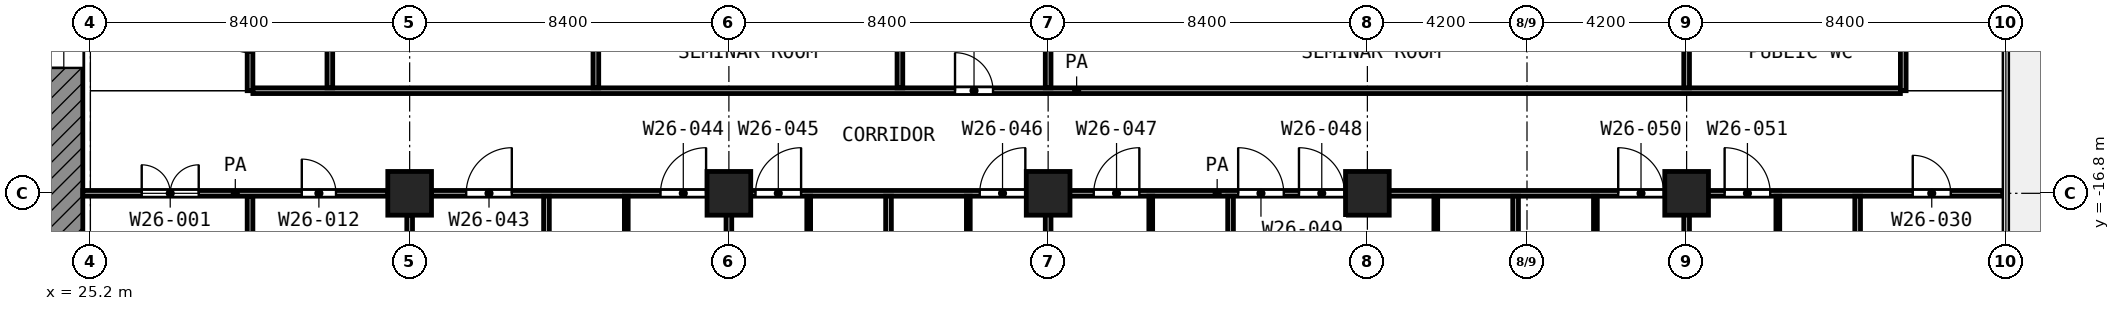
"""IFC4 building model, lengths in metres.
Left out: names, types, materials, properties, quantities, classifications, styles, units other than length and angle.
Written with IfcOpenShell. Run it as: python <this file> out.ifc"""

import sys

from ifc_helpers import new_model, si_unit, direction, frame, frame_2d, origin, origin_2d, place, context, subcontext, project, spatial, rectangle, extrude, element, fill, save


model = new_model("IFC4")
c1 = context("Model", 3, precision=1e-05, world=origin(), true_north=direction((0.0, 1.0)))
c2 = subcontext(c1, "Body", "Model", "MODEL_VIEW")
j1 = project(units=[si_unit("LENGTHUNIT", "METRE"), si_unit("PLANEANGLEUNIT", "RADIAN")], contexts=[c1])
p1 = place(None, origin())
s1 = spatial("IfcSite", under=j1, at=p1, CompositionType="ELEMENT")
p2 = place(p1, origin())
s2 = spatial("IfcBuilding", under=s1, at=p2, CompositionType="ELEMENT")
p3 = place(p2, frame((0.0, 0.0, 136.6)))
s3 = spatial("IfcBuildingStorey", under=s2, at=p3, CompositionType="ELEMENT", Elevation=136.6)
for number, where, z_axis, x_axis in (
    (1, (33.6, -16.8, 0.0), (0.0, 0.0, 1.0), (1.0, 0.0, 0.0)),
    (2, (42.0, -16.8, 0.0), (0.0, 0.0, 1.0), (1.0, 0.0, 0.0)),
    (3, (50.4, -16.8, 0.0), (0.0, 0.0, 1.0), (1.0, 0.0, 0.0)),
    (4, (58.8, -16.8, 0.0), (0.0, 0.0, 1.0), (1.0, 0.0, 0.0)),
    (5, (67.2, -16.8, 0.0), (0.0, 0.0, 1.0), (1.0, 0.0, 0.0)),
):
    element("IfcColumn", number, at=place(p3, frame(where, z_axis=z_axis, x_axis=x_axis)), inside=s3, PredefinedType="COLUMN", context=c2, shape_type="SweptSolid", body=[
        extrude(rectangle(XDim=1.15, YDim=1.15, at=origin_2d()), origin(), (0.0, 0.0, 1.0), 4.2),
    ])
p4 = place(p3, frame((24.5, -24.0, 0.0), z_axis=(0.0, 0.0, 1.0), x_axis=(0.0, 1.0, 0.0)))
e6 = element("IfcWall", 6, at=p4, inside=s3, PredefinedType="SHEAR", context=c2, shape_type="SweptSolid", body=[
    extrude(rectangle(XDim=18.6, YDim=1.0, at=frame_2d((9.3, 0.0))), origin(), (0.0, 0.0, 1.0), 3.6),
])
p5 = place(p4, frame((10.5, 0.0, 0.0)))
e7 = element("IfcOpeningElement", 7, at=p5, cuts=e6, PredefinedType="OPENING", context=c2, shape_type="SweptSolid", body=[
    extrude(rectangle(XDim=1.8, YDim=2.1, at=frame_2d((0.9, 1.05))), frame((0.0, 0.51, 0.0), z_axis=(0.0, -1.0, 0.0), x_axis=(1.0, 0.0, 0.0)), (0.0, 0.0, 1.0), 1.02),
])
for number, where, z_axis, x_axis in (
    (8, (39.3, -20.1, 0.0), (0.0, 0.0, 1.0), (0.0, 1.0, 0.0)),
    (9, (44.1, -20.1, 0.0), (0.0, 0.0, 1.0), (0.0, 1.0, 0.0)),
    (10, (48.3, -20.1, 0.0), (0.0, 0.0, 1.0), (0.0, 1.0, 0.0)),
):
    element("IfcWall", number, at=place(p3, frame(where, z_axis=z_axis, x_axis=x_axis)), inside=s3, PredefinedType="PARTITIONING", context=c2, shape_type="SweptSolid", body=[
        extrude(rectangle(XDim=3.225, YDim=0.1, at=frame_2d((1.613, 0.0))), origin(), (0.0, 0.0, 1.0), 3.6),
    ])
p6 = place(p3, frame((53.1, -19.5, 0.0), z_axis=(0.0, 0.0, 1.0), x_axis=(0.0, 1.0, 0.0)))
e11 = element("IfcWall", 11, at=p6, inside=s3, PredefinedType="PARTITIONING", context=c2, shape_type="SweptSolid", body=[
    extrude(rectangle(XDim=2.625, YDim=0.1, at=frame_2d((1.312, 0.0))), origin(), (0.0, 0.0, 1.0), 3.6),
])
p7 = place(p3, frame((60.6, -20.099, 0.0), z_axis=(0.0, 0.0, 1.0), x_axis=(0.0, 1.0, 0.0)))
e12 = element("IfcWall", 12, at=p7, inside=s3, PredefinedType="PARTITIONING", context=c2, shape_type="SweptSolid", body=[
    extrude(rectangle(XDim=3.224, YDim=0.1, at=frame_2d((1.612, 0.0))), origin(), (0.0, 0.0, 1.0), 3.6),
])
for number, where, z_axis, x_axis in (
    (13, (64.8, -20.1, 0.0), (0.0, 0.0, 1.0), (0.0, 1.0, 0.0)),
    (14, (69.6, -20.1, 0.0), (0.0, 0.0, 1.0), (0.0, 1.0, 0.0)),
):
    element("IfcWall", number, at=place(p3, frame(where, z_axis=z_axis, x_axis=x_axis)), inside=s3, PredefinedType="PARTITIONING", context=c2, shape_type="SweptSolid", body=[
        extrude(rectangle(XDim=3.225, YDim=0.1, at=frame_2d((1.613, 0.0))), origin(), (0.0, 0.0, 1.0), 3.6),
    ])
p8 = place(p3, frame((25.0, -16.8, 0.0), z_axis=(0.0, 0.0, 1.0), x_axis=(1.0, 0.0, 0.0)))
e15 = element("IfcWall", 15, at=p8, inside=s3, PredefinedType="PARTITIONING", context=c2, shape_type="SweptSolid", body=[
    extrude(rectangle(XDim=8.025, YDim=0.15, at=frame_2d((4.012, 0.0))), origin(), (0.0, 0.0, 1.0), 3.6),
])
p9 = place(p8, frame((1.55, 0.0, 0.0)))
e16 = element("IfcOpeningElement", 16, at=p9, cuts=e15, PredefinedType="OPENING", context=c2, shape_type="SweptSolid", body=[
    extrude(rectangle(XDim=1.5, YDim=2.1, at=frame_2d((0.75, 1.05))), frame((0.0, 0.085, 0.0), z_axis=(0.0, -1.0, 0.0), x_axis=(1.0, 0.0, 0.0)), (0.0, 0.0, 1.0), 0.17),
])
p10 = place(p8, frame((5.762, 0.0, 0.0)))
e17 = element("IfcOpeningElement", 17, at=p10, cuts=e15, PredefinedType="OPENING", context=c2, shape_type="SweptSolid", body=[
    extrude(rectangle(XDim=0.9, YDim=2.1, at=frame_2d((0.45, 1.05))), frame((0.0, 0.085, 0.0), z_axis=(0.0, -1.0, 0.0), x_axis=(1.0, 0.0, 0.0)), (0.0, 0.0, 1.0), 0.17),
])
p11 = place(p3, frame((34.175, -16.8, 0.0), z_axis=(0.0, 0.0, 1.0), x_axis=(1.0, 0.0, 0.0)))
e18 = element("IfcWall", 18, at=p11, inside=s3, PredefinedType="PARTITIONING", context=c2, shape_type="SweptSolid", body=[
    extrude(rectangle(XDim=41.345, YDim=0.15, at=frame_2d((20.672, 0.0))), origin(), (0.0, 0.0, 1.0), 3.6),
])
p12 = place(p11, frame((0.913, 0.0, 0.0)))
e19 = element("IfcOpeningElement", 19, at=p12, cuts=e18, PredefinedType="OPENING", context=c2, shape_type="SweptSolid", body=[
    extrude(rectangle(XDim=1.2, YDim=2.1, at=frame_2d((0.6, 1.05))), frame((0.0, 0.085, 0.0), z_axis=(0.0, -1.0, 0.0), x_axis=(1.0, 0.0, 0.0)), (0.0, 0.0, 1.0), 0.17),
])
p13 = place(p11, frame((6.025, 0.0, 0.0)))
e20 = element("IfcOpeningElement", 20, at=p13, cuts=e18, PredefinedType="OPENING", context=c2, shape_type="SweptSolid", body=[
    extrude(rectangle(XDim=1.2, YDim=2.1, at=frame_2d((0.6, 1.05))), frame((0.0, 0.085, 0.0), z_axis=(0.0, -1.0, 0.0), x_axis=(1.0, 0.0, 0.0)), (0.0, 0.0, 1.0), 0.17),
])
p14 = place(p11, frame((8.525, 0.0, 0.0)))
e21 = element("IfcOpeningElement", 21, at=p14, cuts=e18, PredefinedType="OPENING", context=c2, shape_type="SweptSolid", body=[
    extrude(rectangle(XDim=1.2, YDim=2.1, at=frame_2d((0.6, 1.05))), frame((0.0, 0.085, 0.0), z_axis=(0.0, -1.0, 0.0), x_axis=(1.0, 0.0, 0.0)), (0.0, 0.0, 1.0), 0.17),
])
p15 = place(p11, frame((14.425, 0.0, 0.0)))
e22 = element("IfcOpeningElement", 22, at=p15, cuts=e18, PredefinedType="OPENING", context=c2, shape_type="SweptSolid", body=[
    extrude(rectangle(XDim=1.2, YDim=2.1, at=frame_2d((0.6, 1.05))), frame((0.0, 0.085, 0.0), z_axis=(0.0, -1.0, 0.0), x_axis=(1.0, 0.0, 0.0)), (0.0, 0.0, 1.0), 0.17),
])
p16 = place(p11, frame((17.425, 0.0, 0.0)))
e23 = element("IfcOpeningElement", 23, at=p16, cuts=e18, PredefinedType="OPENING", context=c2, shape_type="SweptSolid", body=[
    extrude(rectangle(XDim=1.2, YDim=2.1, at=frame_2d((0.6, 1.05))), frame((0.0, 0.085, 0.0), z_axis=(0.0, -1.0, 0.0), x_axis=(1.0, 0.0, 0.0)), (0.0, 0.0, 1.0), 0.17),
])
p17 = place(p11, frame((22.825, 0.0, 0.0)))
e24 = element("IfcOpeningElement", 24, at=p17, cuts=e18, PredefinedType="OPENING", context=c2, shape_type="SweptSolid", body=[
    extrude(rectangle(XDim=1.2, YDim=2.1, at=frame_2d((0.6, 1.05))), frame((0.0, 0.085, 0.0), z_axis=(0.0, -1.0, 0.0), x_axis=(1.0, 0.0, 0.0)), (0.0, 0.0, 1.0), 0.17),
])
p18 = place(p11, frame((21.225, 0.0, 0.0)))
e25 = element("IfcOpeningElement", 25, at=p18, cuts=e18, PredefinedType="OPENING", context=c2, shape_type="SweptSolid", body=[
    extrude(rectangle(XDim=1.2, YDim=2.1, at=frame_2d((0.6, 1.05))), frame((0.0, 0.085, 0.0), z_axis=(0.0, -1.0, 0.0), x_axis=(1.0, 0.0, 0.0)), (0.0, 0.0, 1.0), 0.17),
])
p19 = place(p11, frame((31.225, 0.0, 0.0)))
e26 = element("IfcOpeningElement", 26, at=p19, cuts=e18, PredefinedType="OPENING", context=c2, shape_type="SweptSolid", body=[
    extrude(rectangle(XDim=1.2, YDim=2.1, at=frame_2d((0.6, 1.05))), frame((0.0, 0.085, 0.0), z_axis=(0.0, -1.0, 0.0), x_axis=(1.0, 0.0, 0.0)), (0.0, 0.0, 1.0), 0.17),
])
p20 = place(p11, frame((34.025, 0.0, 0.0)))
e27 = element("IfcOpeningElement", 27, at=p20, cuts=e18, PredefinedType="OPENING", context=c2, shape_type="SweptSolid", body=[
    extrude(rectangle(XDim=1.2, YDim=2.1, at=frame_2d((0.6, 1.05))), frame((0.0, 0.085, 0.0), z_axis=(0.0, -1.0, 0.0), x_axis=(1.0, 0.0, 0.0)), (0.0, 0.0, 1.0), 0.17),
])
p21 = place(p11, frame((38.975, 0.0, 0.0)))
e28 = element("IfcOpeningElement", 28, at=p21, cuts=e18, PredefinedType="OPENING", context=c2, shape_type="SweptSolid", body=[
    extrude(rectangle(XDim=1.0, YDim=2.1, at=frame_2d((0.5, 1.05))), frame((0.0, 0.085, 0.0), z_axis=(0.0, -1.0, 0.0), x_axis=(1.0, 0.0, 0.0)), (0.0, 0.0, 1.0), 0.17),
])
p22 = place(p3, frame((29.475, -14.1, 0.0), z_axis=(0.0, 0.0, 1.0), x_axis=(1.0, 0.0, 0.0)))
e29 = element("IfcWall", 29, at=p22, inside=s3, PredefinedType="PARTITIONING", context=c2, shape_type="SweptSolid", body=[
    extrude(rectangle(XDim=43.35, YDim=0.15, at=frame_2d((21.675, 0.0))), origin(), (0.0, 0.0, 1.0), 3.6),
])
p23 = place(p22, frame((18.475, 0.0, 0.0)))
e30 = element("IfcOpeningElement", 30, at=p23, cuts=e29, PredefinedType="OPENING", context=c2, shape_type="SweptSolid", body=[
    extrude(rectangle(XDim=1.0, YDim=2.1, at=frame_2d((0.5, 1.05))), frame((0.0, 0.085, 0.0), z_axis=(0.0, -1.0, 0.0), x_axis=(1.0, 0.0, 0.0)), (0.0, 0.0, 1.0), 0.17),
])
p24 = place(p3, frame((29.4, -25.2, 0.0), z_axis=(0.0, 0.0, 1.0), x_axis=(0.0, 1.0, 0.0)))
e31 = element("IfcWall", 31, at=p24, inside=s3, PredefinedType="PARTITIONING", context=c2, shape_type="SweptSolid", body=[
    extrude(rectangle(XDim=8.325, YDim=0.15, at=frame_2d((4.163, 0.0))), origin(), (0.0, 0.0, 1.0), 3.6),
])
p25 = place(p3, frame((29.4, -14.1, 0.0), z_axis=(0.0, 0.0, 1.0), x_axis=(0.0, 1.0, 0.0)))
e32 = element("IfcWall", 32, at=p25, inside=s3, PredefinedType="PARTITIONING", context=c2, shape_type="SweptSolid", body=[
    extrude(rectangle(XDim=3.0, YDim=0.15, at=frame_2d((1.5, 0.0))), origin(), (0.0, 0.0, 1.0), 3.6),
])
p26 = place(p25, frame((1.0, 0.0, 0.0)))
e33 = element("IfcOpeningElement", 33, at=p26, cuts=e32, PredefinedType="OPENING", context=c2, shape_type="SweptSolid", body=[
    extrude(rectangle(XDim=1.0, YDim=2.1, at=frame_2d((0.5, 1.05))), frame((0.0, 0.085, 0.0), z_axis=(0.0, -1.0, 0.0), x_axis=(1.0, 0.0, 0.0)), (0.0, 0.0, 1.0), 0.17),
])
p27 = place(p3, frame((31.5, -14.025, 0.0), z_axis=(0.0, 0.0, 1.0), x_axis=(0.0, 1.0, 0.0)))
e34 = element("IfcWall", 34, at=p27, inside=s3, PredefinedType="PARTITIONING", context=c2, shape_type="SweptSolid", body=[
    extrude(rectangle(XDim=2.85, YDim=0.15, at=frame_2d((1.425, 0.0))), origin(), (0.0, 0.0, 1.0), 3.6),
])
p28 = place(p3, frame((33.6, -25.12, 0.0), z_axis=(0.0, 0.0, 1.0), x_axis=(0.0, 1.0, 0.0)))
e35 = element("IfcWall", 35, at=p28, inside=s3, PredefinedType="PARTITIONING", context=c2, shape_type="SweptSolid", body=[
    extrude(rectangle(XDim=7.745, YDim=0.15, at=frame_2d((3.873, 0.0))), origin(), (0.0, 0.0, 1.0), 2.7),
])
p29 = place(p3, frame((37.2, -25.12, 0.0), z_axis=(0.0, 0.0, 1.0), x_axis=(0.0, 1.0, 0.0)))
e36 = element("IfcWall", 36, at=p29, inside=s3, PredefinedType="PARTITIONING", context=c2, shape_type="SweptSolid", body=[
    extrude(rectangle(XDim=8.245, YDim=0.15, at=frame_2d((4.123, 0.0))), origin(), (0.0, 0.0, 1.0), 2.7),
])
p30 = place(p3, frame((38.5, -14.025, 0.0), z_axis=(0.0, 0.0, 1.0), x_axis=(0.0, 1.0, 0.0)))
e37 = element("IfcWall", 37, at=p30, inside=s3, PredefinedType="PARTITIONING", context=c2, shape_type="SweptSolid", body=[
    extrude(rectangle(XDim=2.85, YDim=0.15, at=frame_2d((1.425, 0.0))), origin(), (0.0, 0.0, 1.0), 3.6),
])
p31 = place(p3, frame((42.0, -25.12, 0.0), z_axis=(0.0, 0.0, 1.0), x_axis=(0.0, 1.0, 0.0)))
e38 = element("IfcWall", 38, at=p31, inside=s3, PredefinedType="PARTITIONING", context=c2, shape_type="SweptSolid", body=[
    extrude(rectangle(XDim=8.245, YDim=0.15, at=frame_2d((4.123, 0.0))), origin(), (0.0, 0.0, 1.0), 3.6),
])
p32 = place(p3, frame((46.2, -25.12, 0.0), z_axis=(0.0, 0.0, 1.0), x_axis=(0.0, 1.0, 0.0)))
e39 = element("IfcWall", 39, at=p32, inside=s3, PredefinedType="PARTITIONING", context=c2, shape_type="SweptSolid", body=[
    extrude(rectangle(XDim=8.245, YDim=0.15, at=frame_2d((4.123, 0.0))), origin(), (0.0, 0.0, 1.0), 2.7),
])
p33 = place(p3, frame((46.5, -14.025, 0.0), z_axis=(0.0, 0.0, 1.0), x_axis=(0.0, 1.0, 0.0)))
e40 = element("IfcWall", 40, at=p33, inside=s3, PredefinedType="PARTITIONING", context=c2, shape_type="SweptSolid", body=[
    extrude(rectangle(XDim=2.85, YDim=0.15, at=frame_2d((1.425, 0.0))), origin(), (0.0, 0.0, 1.0), 3.6),
])
p34 = place(p3, frame((50.4, -25.12, 0.0), z_axis=(0.0, 0.0, 1.0), x_axis=(0.0, 1.0, 0.0)))
e41 = element("IfcWall", 41, at=p34, inside=s3, PredefinedType="PARTITIONING", context=c2, shape_type="SweptSolid", body=[
    extrude(rectangle(XDim=8.245, YDim=0.15, at=frame_2d((4.123, 0.0))), origin(), (0.0, 0.0, 1.0), 3.6),
])
p35 = place(p3, frame((50.4, -14.025, 0.0), z_axis=(0.0, 0.0, 1.0), x_axis=(0.0, 1.0, 0.0)))
e42 = element("IfcWall", 42, at=p35, inside=s3, PredefinedType="PARTITIONING", context=c2, shape_type="SweptSolid", body=[
    extrude(rectangle(XDim=2.85, YDim=0.15, at=frame_2d((1.425, 0.0))), origin(), (0.0, 0.0, 1.0), 3.6),
])
for number, where, z_axis, x_axis in (
    (43, (55.2, -25.12, 0.0), (0.0, 0.0, 1.0), (0.0, 1.0, 0.0)),
    (44, (62.7, -25.12, 0.0), (0.0, 0.0, 1.0), (0.0, 1.0, 0.0)),
    (45, (67.2, -25.12, 0.0), (0.0, 0.0, 1.0), (0.0, 1.0, 0.0)),
):
    element("IfcWall", number, at=place(p3, frame(where, z_axis=z_axis, x_axis=x_axis)), inside=s3, PredefinedType="PARTITIONING", context=c2, shape_type="SweptSolid", body=[
        extrude(rectangle(XDim=8.245, YDim=0.15, at=frame_2d((4.123, 0.0))), origin(), (0.0, 0.0, 1.0), 2.7),
    ])
p36 = place(p3, frame((67.2, -14.025, 0.0), z_axis=(0.0, 0.0, 1.0), x_axis=(0.0, 1.0, 0.0)))
e46 = element("IfcWall", 46, at=p36, inside=s3, PredefinedType="PARTITIONING", context=c2, shape_type="SweptSolid", body=[
    extrude(rectangle(XDim=2.85, YDim=0.15, at=frame_2d((1.425, 0.0))), origin(), (0.0, 0.0, 1.0), 3.6),
])
p37 = place(p3, frame((71.7, -22.987, 0.0), z_axis=(0.0, 0.0, 1.0), x_axis=(0.0, 1.0, 0.0)))
e47 = element("IfcWall", 47, at=p37, inside=s3, PredefinedType="PARTITIONING", context=c2, shape_type="SweptSolid", body=[
    extrude(rectangle(XDim=6.112, YDim=0.15, at=frame_2d((3.056, 0.0))), origin(), (0.0, 0.0, 1.0), 2.7),
])
p38 = place(p3, frame((72.9, -14.1, 0.0), z_axis=(0.0, 0.0, 1.0), x_axis=(0.0, 1.0, 0.0)))
e48 = element("IfcWall", 48, at=p38, inside=s3, PredefinedType="PARTITIONING", context=c2, shape_type="SweptSolid", body=[
    extrude(rectangle(XDim=3.0, YDim=0.15, at=frame_2d((1.5, 0.0))), origin(), (0.0, 0.0, 1.0), 3.6),
])
p39 = place(p5, origin())
e49 = element("IfcDoor", 49, at=p39, inside=s3, OperationType="DOUBLE_DOOR_SINGLE_SWING", PredefinedType="DOOR", context=c2, shape_type="SweptSolid", body=[
    extrude(rectangle(XDim=1.8, YDim=2.1, at=frame_2d((0.9, 1.05))), frame((0.0, 0.025, 0.0), z_axis=(0.0, -1.0, 0.0), x_axis=(1.0, 0.0, 0.0)), (0.0, 0.0, 1.0), 0.05),
])
fill(e7, e49)
p40 = place(p9, origin())
e50 = element("IfcDoor", 50, at=p40, inside=s3, OperationType="DOUBLE_DOOR_SINGLE_SWING", PredefinedType="DOOR", context=c2, shape_type="SweptSolid", body=[
    extrude(rectangle(XDim=1.5, YDim=2.1, at=frame_2d((0.75, 1.05))), frame((0.0, 0.025, 0.0), z_axis=(0.0, -1.0, 0.0), x_axis=(1.0, 0.0, 0.0)), (0.0, 0.0, 1.0), 0.05),
])
fill(e16, e50)
p41 = place(p23, origin())
e51 = element("IfcDoor", 51, at=p41, inside=s3, OperationType="SINGLE_SWING_LEFT", PredefinedType="DOOR", context=c2, shape_type="SweptSolid", body=[
    extrude(rectangle(XDim=1.0, YDim=2.1, at=frame_2d((0.5, 1.05))), frame((0.0, 0.025, 0.0), z_axis=(0.0, -1.0, 0.0), x_axis=(1.0, 0.0, 0.0)), (0.0, 0.0, 1.0), 0.05),
])
fill(e30, e51)
p42 = place(p10, origin())
e52 = element("IfcDoor", 52, at=p42, inside=s3, OperationType="SINGLE_SWING_LEFT", PredefinedType="DOOR", context=c2, shape_type="SweptSolid", body=[
    extrude(rectangle(XDim=0.9, YDim=2.1, at=frame_2d((0.45, 1.05))), frame((0.0, 0.025, 0.0), z_axis=(0.0, -1.0, 0.0), x_axis=(1.0, 0.0, 0.0)), (0.0, 0.0, 1.0), 0.05),
])
fill(e17, e52)
p43 = place(p12, origin())
e53 = element("IfcDoor", 53, at=p43, inside=s3, OperationType="SINGLE_SWING_RIGHT", PredefinedType="DOOR", context=c2, shape_type="SweptSolid", body=[
    extrude(rectangle(XDim=1.2, YDim=2.1, at=frame_2d((0.6, 1.05))), frame((0.0, 0.025, 0.0), z_axis=(0.0, -1.0, 0.0), x_axis=(1.0, 0.0, 0.0)), (0.0, 0.0, 1.0), 0.05),
])
fill(e19, e53)
p44 = place(p13, origin())
e54 = element("IfcDoor", 54, at=p44, inside=s3, OperationType="SINGLE_SWING_RIGHT", PredefinedType="DOOR", context=c2, shape_type="SweptSolid", body=[
    extrude(rectangle(XDim=1.2, YDim=2.1, at=frame_2d((0.6, 1.05))), frame((0.0, 0.025, 0.0), z_axis=(0.0, -1.0, 0.0), x_axis=(1.0, 0.0, 0.0)), (0.0, 0.0, 1.0), 0.05),
])
fill(e20, e54)
p45 = place(p14, origin())
e55 = element("IfcDoor", 55, at=p45, inside=s3, OperationType="SINGLE_SWING_RIGHT", PredefinedType="DOOR", context=c2, shape_type="SweptSolid", body=[
    extrude(rectangle(XDim=1.2, YDim=2.1, at=frame_2d((0.6, 1.05))), frame((0.0, 0.025, 0.0), z_axis=(0.0, -1.0, 0.0), x_axis=(1.0, 0.0, 0.0)), (0.0, 0.0, 1.0), 0.05),
])
fill(e21, e55)
p46 = place(p15, origin())
e56 = element("IfcDoor", 56, at=p46, inside=s3, OperationType="SINGLE_SWING_RIGHT", PredefinedType="DOOR", context=c2, shape_type="SweptSolid", body=[
    extrude(rectangle(XDim=1.2, YDim=2.1, at=frame_2d((0.6, 1.05))), frame((0.0, 0.025, 0.0), z_axis=(0.0, -1.0, 0.0), x_axis=(1.0, 0.0, 0.0)), (0.0, 0.0, 1.0), 0.05),
])
fill(e22, e56)
p47 = place(p16, origin())
e57 = element("IfcDoor", 57, at=p47, inside=s3, OperationType="SINGLE_SWING_RIGHT", PredefinedType="DOOR", context=c2, shape_type="SweptSolid", body=[
    extrude(rectangle(XDim=1.2, YDim=2.1, at=frame_2d((0.6, 1.05))), frame((0.0, 0.025, 0.0), z_axis=(0.0, -1.0, 0.0), x_axis=(1.0, 0.0, 0.0)), (0.0, 0.0, 1.0), 0.05),
])
fill(e23, e57)
p48 = place(p17, origin())
e58 = element("IfcDoor", 58, at=p48, inside=s3, OperationType="SINGLE_SWING_LEFT", PredefinedType="DOOR", context=c2, shape_type="SweptSolid", body=[
    extrude(rectangle(XDim=1.2, YDim=2.1, at=frame_2d((0.6, 1.05))), frame((0.0, 0.025, 0.0), z_axis=(0.0, -1.0, 0.0), x_axis=(1.0, 0.0, 0.0)), (0.0, 0.0, 1.0), 0.05),
])
fill(e24, e58)
p49 = place(p18, origin())
e59 = element("IfcDoor", 59, at=p49, inside=s3, OperationType="SINGLE_SWING_LEFT", PredefinedType="DOOR", context=c2, shape_type="SweptSolid", body=[
    extrude(rectangle(XDim=1.2, YDim=2.1, at=frame_2d((0.6, 1.05))), frame((0.0, 0.025, 0.0), z_axis=(0.0, -1.0, 0.0), x_axis=(1.0, 0.0, 0.0)), (0.0, 0.0, 1.0), 0.05),
])
fill(e25, e59)
p50 = place(p19, origin())
e60 = element("IfcDoor", 60, at=p50, inside=s3, OperationType="SINGLE_SWING_LEFT", PredefinedType="DOOR", context=c2, shape_type="SweptSolid", body=[
    extrude(rectangle(XDim=1.2, YDim=2.1, at=frame_2d((0.6, 1.05))), frame((0.0, 0.025, 0.0), z_axis=(0.0, -1.0, 0.0), x_axis=(1.0, 0.0, 0.0)), (0.0, 0.0, 1.0), 0.05),
])
fill(e26, e60)
p51 = place(p20, origin())
e61 = element("IfcDoor", 61, at=p51, inside=s3, OperationType="SINGLE_SWING_LEFT", PredefinedType="DOOR", context=c2, shape_type="SweptSolid", body=[
    extrude(rectangle(XDim=1.2, YDim=2.1, at=frame_2d((0.6, 1.05))), frame((0.0, 0.025, 0.0), z_axis=(0.0, -1.0, 0.0), x_axis=(1.0, 0.0, 0.0)), (0.0, 0.0, 1.0), 0.05),
])
fill(e27, e61)
p52 = place(p21, origin())
e62 = element("IfcDoor", 62, at=p52, inside=s3, OperationType="SINGLE_SWING_LEFT", PredefinedType="DOOR", context=c2, shape_type="SweptSolid", body=[
    extrude(rectangle(XDim=1.0, YDim=2.1, at=frame_2d((0.5, 1.05))), frame((0.0, 0.025, 0.0), z_axis=(0.0, -1.0, 0.0), x_axis=(1.0, 0.0, 0.0)), (0.0, 0.0, 1.0), 0.05),
])
fill(e28, e62)
save(model, sys.argv[1])
